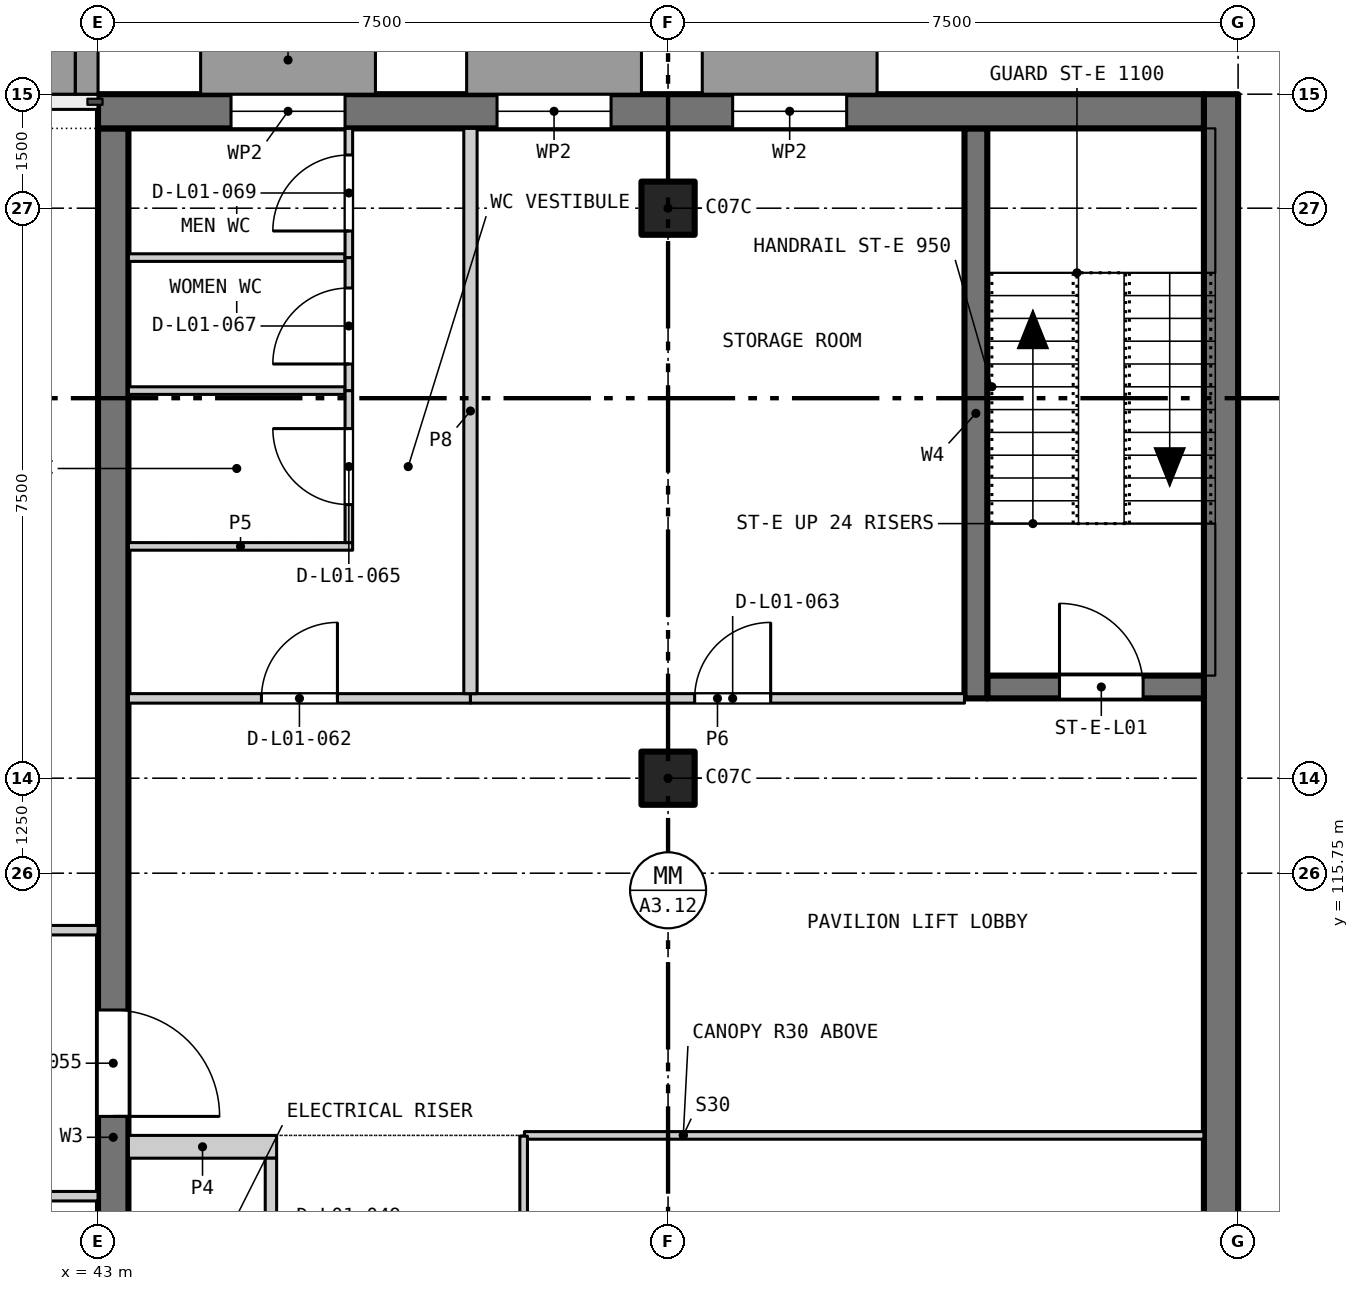
"""IFC4 building model, lengths in metres.
Left out: names, types, materials, properties, quantities, classifications, styles, units other than length and angle.
Written with IfcOpenShell. Run it as: python <this file> out.ifc"""

import sys

from ifc_helpers import new_model, si_unit, direction, frame, frame_2d, origin, origin_2d, place, context, subcontext, project, spatial, rectangle, extrude, element, fill, save


model = new_model("IFC4")
c1 = context("Model", 3, precision=1e-05, world=origin(), true_north=direction((0.0, 1.0)))
c2 = subcontext(c1, "Body", "Model", "MODEL_VIEW")
j1 = project(units=[si_unit("LENGTHUNIT", "METRE"), si_unit("PLANEANGLEUNIT", "RADIAN")], contexts=[c1])
p1 = place(None, origin())
s1 = spatial("IfcSite", under=j1, at=p1, CompositionType="ELEMENT")
p2 = place(p1, origin())
s2 = spatial("IfcBuilding", under=s1, at=p2, CompositionType="ELEMENT")
p3 = place(p2, frame((0.0, 0.0, 6.0)))
s3 = spatial("IfcBuildingStorey", under=s2, at=p3, CompositionType="ELEMENT", Elevation=6.0)
for number, where, z_axis, x_axis in (
    (1, (50.5, 117.0, 0.0), (0.0, 0.0, 1.0), (1.0, 0.0, 0.0)),
    (2, (50.5, 124.5, 0.0), (0.0, 0.0, 1.0), (1.0, 0.0, 0.0)),
):
    element("IfcColumn", number, at=place(p3, frame(where, z_axis=z_axis, x_axis=x_axis)), inside=s3, PredefinedType="COLUMN", context=c2, shape_type="SweptSolid", body=[
        extrude(rectangle(XDim=0.7, YDim=0.7, at=origin_2d()), origin(), (0.0, 0.0, 1.0), 3.9),
    ])
p4 = place(p3, frame((43.2, 99.0, 0.0), z_axis=(0.0, 0.0, 1.0), x_axis=(0.0, 1.0, 0.0)))
e3 = element("IfcWall", 3, at=p4, inside=s3, PredefinedType="SHEAR", context=c2, shape_type="SweptSolid", body=[
    extrude(rectangle(XDim=26.55, YDim=0.4, at=frame_2d((13.275, 0.0))), origin(), (0.0, 0.0, 1.0), 4.2),
])
p5 = place(p4, frame((13.55, 0.0, 0.0)))
e4 = element("IfcOpeningElement", 4, at=p5, cuts=e3, PredefinedType="OPENING", context=c2, shape_type="SweptSolid", body=[
    extrude(rectangle(XDim=1.4, YDim=2.4, at=frame_2d((0.7, 1.2))), frame((0.0, 0.21, 0.0), z_axis=(0.0, -1.0, 0.0), x_axis=(1.0, 0.0, 0.0)), (0.0, 0.0, 1.0), 0.42),
])
p6 = place(p3, frame((54.7, 118.2, 0.0), z_axis=(0.0, 0.0, 1.0), x_axis=(1.0, 0.0, 0.0)))
e5 = element("IfcWall", 5, at=p6, inside=s3, PredefinedType="SHEAR", context=c2, shape_type="SweptSolid", body=[
    extrude(rectangle(XDim=3.0, YDim=0.3, at=frame_2d((1.5, 0.0))), origin(), (0.0, 0.0, 1.0), 4.2),
])
p7 = place(p6, frame((0.95, 0.0, 0.0)))
e6 = element("IfcOpeningElement", 6, at=p7, cuts=e5, PredefinedType="OPENING", context=c2, shape_type="SweptSolid", body=[
    extrude(rectangle(XDim=1.1, YDim=2.1, at=frame_2d((0.55, 1.05))), frame((0.0, 0.16, 0.0), z_axis=(0.0, -1.0, 0.0), x_axis=(1.0, 0.0, 0.0)), (0.0, 0.0, 1.0), 0.32),
])
p8 = place(p3, frame((54.55, 118.05, 0.0), z_axis=(0.0, 0.0, 1.0), x_axis=(0.0, 1.0, 0.0)))
e7 = element("IfcWall", 7, at=p8, inside=s3, PredefinedType="SHEAR", context=c2, shape_type="SweptSolid", body=[
    extrude(rectangle(XDim=7.5, YDim=0.3, at=frame_2d((3.75, 0.0))), origin(), (0.0, 0.0, 1.0), 4.2),
])
p9 = place(p3, frame((57.775, 126.0, 0.0), z_axis=(0.0, 0.0, 1.0), x_axis=(0.0, -1.0, 0.0)))
e8 = element("IfcWall", 8, at=p9, inside=s3, PredefinedType="SOLIDWALL", context=c2, shape_type="SweptSolid", body=[
    extrude(rectangle(XDim=27.0, YDim=0.45, at=frame_2d((13.5, 0.0))), origin(), (0.0, 0.0, 1.0), 3.9),
])
p10 = place(p9, frame((20.75, 0.0, 0.8)))
e9 = element("IfcOpeningElement", 9, at=p10, cuts=e8, PredefinedType="OPENING", context=c2, shape_type="SweptSolid", body=[
    extrude(rectangle(XDim=1.5, YDim=2.2, at=frame_2d((0.75, 1.1))), frame((0.0, 0.235, 0.0), z_axis=(0.0, -1.0, 0.0), x_axis=(1.0, 0.0, 0.0)), (0.0, 0.0, 1.0), 0.47),
])
p11 = place(p9, frame((14.75, 0.0, 0.8)))
e10 = element("IfcOpeningElement", 10, at=p11, cuts=e8, PredefinedType="OPENING", context=c2, shape_type="SweptSolid", body=[
    extrude(rectangle(XDim=1.5, YDim=2.2, at=frame_2d((0.75, 1.1))), frame((0.0, 0.235, 0.0), z_axis=(0.0, -1.0, 0.0), x_axis=(1.0, 0.0, 0.0)), (0.0, 0.0, 1.0), 0.47),
])
p12 = place(p3, frame((43.0, 125.775, 0.0), z_axis=(0.0, 0.0, 1.0), x_axis=(1.0, 0.0, 0.0)))
e11 = element("IfcWall", 11, at=p12, inside=s3, PredefinedType="SOLIDWALL", context=c2, shape_type="SweptSolid", body=[
    extrude(rectangle(XDim=14.55, YDim=0.45, at=frame_2d((7.275, 0.0))), origin(), (0.0, 0.0, 1.0), 3.9),
])
p13 = place(p12, frame((8.35, 0.0, 0.8)))
e12 = element("IfcOpeningElement", 12, at=p13, cuts=e11, PredefinedType="OPENING", context=c2, shape_type="SweptSolid", body=[
    extrude(rectangle(XDim=1.5, YDim=2.2, at=frame_2d((0.75, 1.1))), frame((0.0, 0.235, 0.0), z_axis=(0.0, -1.0, 0.0), x_axis=(1.0, 0.0, 0.0)), (0.0, 0.0, 1.0), 0.47),
])
p14 = place(p12, frame((5.25, 0.0, 0.8)))
e13 = element("IfcOpeningElement", 13, at=p14, cuts=e11, PredefinedType="OPENING", context=c2, shape_type="SweptSolid", body=[
    extrude(rectangle(XDim=1.5, YDim=2.2, at=frame_2d((0.75, 1.1))), frame((0.0, 0.235, 0.0), z_axis=(0.0, -1.0, 0.0), x_axis=(1.0, 0.0, 0.0)), (0.0, 0.0, 1.0), 0.47),
])
p15 = place(p12, frame((1.75, 0.0, 0.8)))
e14 = element("IfcOpeningElement", 14, at=p15, cuts=e11, PredefinedType="OPENING", context=c2, shape_type="SweptSolid", body=[
    extrude(rectangle(XDim=1.5, YDim=2.2, at=frame_2d((0.75, 1.1))), frame((0.0, 0.235, 0.0), z_axis=(0.0, -1.0, 0.0), x_axis=(1.0, 0.0, 0.0)), (0.0, 0.0, 1.0), 0.47),
])
p16 = place(p3, frame((43.4, 112.15, 0.0), z_axis=(0.0, 0.0, 1.0), x_axis=(1.0, 0.0, 0.0)))
e15 = element("IfcWall", 15, at=p16, inside=s3, PredefinedType="PARTITIONING", context=c2, shape_type="SweptSolid", body=[
    extrude(rectangle(XDim=1.95, YDim=0.3, at=frame_2d((0.975, 0.0))), origin(), (0.0, 0.0, 1.0), 3.9),
])
p17 = place(p3, frame((45.275, 108.4, 0.0), z_axis=(0.0, 0.0, 1.0), x_axis=(0.0, 1.0, 0.0)))
e16 = element("IfcWall", 16, at=p17, inside=s3, PredefinedType="PARTITIONING", context=c2, shape_type="SweptSolid", body=[
    extrude(rectangle(XDim=3.6, YDim=0.15, at=frame_2d((1.8, 0.0))), origin(), (0.0, 0.0, 1.0), 3.9),
])
p18 = place(p17, frame((1.35, 0.0, 0.0)))
e17 = element("IfcOpeningElement", 17, at=p18, cuts=e16, PredefinedType="OPENING", context=c2, shape_type="SweptSolid", body=[
    extrude(rectangle(XDim=0.9, YDim=2.1, at=frame_2d((0.45, 1.05))), frame((0.0, 0.085, 0.0), z_axis=(0.0, -1.0, 0.0), x_axis=(1.0, 0.0, 0.0)), (0.0, 0.0, 1.0), 0.17),
])
p19 = place(p3, frame((29.0, 111.5, 0.0), z_axis=(0.0, 0.0, 1.0), x_axis=(1.0, 0.0, 0.0)))
e18 = element("IfcWall", 18, at=p19, inside=s3, PredefinedType="PARTITIONING", context=c2, shape_type="SweptSolid", body=[
    extrude(rectangle(XDim=14.0, YDim=0.125, at=frame_2d((7.0, 0.0))), origin(), (0.0, 0.0, 1.0), 3.9),
])
p20 = place(p19, frame((1.2, 0.0, 0.0)))
e19 = element("IfcOpeningElement", 19, at=p20, cuts=e18, PredefinedType="OPENING", context=c2, shape_type="SweptSolid", body=[
    extrude(rectangle(XDim=1.8, YDim=2.1, at=frame_2d((0.9, 1.05))), frame((0.0, 0.073, 0.0), z_axis=(0.0, -1.0, 0.0), x_axis=(1.0, 0.0, 0.0)), (0.0, 0.0, 1.0), 0.145),
])
p21 = place(p19, frame((11.0, 0.0, 0.0)))
e20 = element("IfcOpeningElement", 20, at=p21, cuts=e18, PredefinedType="OPENING", context=c2, shape_type="SweptSolid", body=[
    extrude(rectangle(XDim=1.8, YDim=2.1, at=frame_2d((0.9, 1.05))), frame((0.0, 0.073, 0.0), z_axis=(0.0, -1.0, 0.0), x_axis=(1.0, 0.0, 0.0)), (0.0, 0.0, 1.0), 0.145),
])
p22 = place(p3, frame((48.61, 112.3, 0.0), z_axis=(0.0, 0.0, 1.0), x_axis=(1.0, 0.0, 0.0)))
e21 = element("IfcWall", 21, at=p22, inside=s3, PredefinedType="PARTITIONING", context=c2, shape_type="SweptSolid", body=[
    extrude(rectangle(XDim=8.94, YDim=0.1, at=frame_2d((4.47, 0.0))), origin(), (0.0, 0.0, 1.0), 3.9),
])
p23 = place(p3, frame((29.0, 115.0, 0.0), z_axis=(0.0, 0.0, 1.0), x_axis=(1.0, 0.0, 0.0)))
e22 = element("IfcWall", 22, at=p23, inside=s3, PredefinedType="PARTITIONING", context=c2, shape_type="SweptSolid", body=[
    extrude(rectangle(XDim=14.0, YDim=0.125, at=frame_2d((7.0, 0.0))), origin(), (0.0, 0.0, 1.0), 3.9),
])
p24 = place(p23, frame((1.2, 0.0, 0.0)))
e23 = element("IfcOpeningElement", 23, at=p24, cuts=e22, PredefinedType="OPENING", context=c2, shape_type="SweptSolid", body=[
    extrude(rectangle(XDim=1.8, YDim=2.1, at=frame_2d((0.9, 1.05))), frame((0.0, 0.073, 0.0), z_axis=(0.0, -1.0, 0.0), x_axis=(1.0, 0.0, 0.0)), (0.0, 0.0, 1.0), 0.145),
])
p25 = place(p23, frame((11.0, 0.0, 0.0)))
e24 = element("IfcOpeningElement", 24, at=p25, cuts=e22, PredefinedType="OPENING", context=c2, shape_type="SweptSolid", body=[
    extrude(rectangle(XDim=1.8, YDim=2.1, at=frame_2d((0.9, 1.05))), frame((0.0, 0.073, 0.0), z_axis=(0.0, -1.0, 0.0), x_axis=(1.0, 0.0, 0.0)), (0.0, 0.0, 1.0), 0.145),
])
p26 = place(p3, frame((43.4, 118.05, 0.0), z_axis=(0.0, 0.0, 1.0), x_axis=(1.0, 0.0, 0.0)))
e25 = element("IfcWall", 25, at=p26, inside=s3, PredefinedType="PARTITIONING", context=c2, shape_type="SweptSolid", body=[
    extrude(rectangle(XDim=4.5, YDim=0.125, at=frame_2d((2.25, 0.0))), origin(), (0.0, 0.0, 1.0), 3.9),
])
p27 = place(p26, frame((1.75, 0.0, 0.0)))
e26 = element("IfcOpeningElement", 26, at=p27, cuts=e25, PredefinedType="OPENING", context=c2, shape_type="SweptSolid", body=[
    extrude(rectangle(XDim=1.0, YDim=2.1, at=frame_2d((0.5, 1.05))), frame((0.0, 0.073, 0.0), z_axis=(0.0, -1.0, 0.0), x_axis=(1.0, 0.0, 0.0)), (0.0, 0.0, 1.0), 0.145),
])
p28 = place(p3, frame((47.9, 118.05, 0.0), z_axis=(0.0, 0.0, 1.0), x_axis=(1.0, 0.0, 0.0)))
e27 = element("IfcWall", 27, at=p28, inside=s3, PredefinedType="PARTITIONING", context=c2, shape_type="SweptSolid", body=[
    extrude(rectangle(XDim=6.5, YDim=0.125, at=frame_2d((3.25, 0.0))), origin(), (0.0, 0.0, 1.0), 3.9),
])
p29 = place(p28, frame((2.95, 0.0, 0.0)))
e28 = element("IfcOpeningElement", 28, at=p29, cuts=e27, PredefinedType="OPENING", context=c2, shape_type="SweptSolid", body=[
    extrude(rectangle(XDim=1.0, YDim=2.1, at=frame_2d((0.5, 1.05))), frame((0.0, 0.073, 0.0), z_axis=(0.0, -1.0, 0.0), x_axis=(1.0, 0.0, 0.0)), (0.0, 0.0, 1.0), 0.145),
])
p30 = place(p3, frame((43.4, 120.05, 0.0), z_axis=(0.0, 0.0, 1.0), x_axis=(1.0, 0.0, 0.0)))
e29 = element("IfcWall", 29, at=p30, inside=s3, PredefinedType="PARTITIONING", context=c2, shape_type="SweptSolid", body=[
    extrude(rectangle(XDim=2.95, YDim=0.1, at=frame_2d((1.475, 0.0))), origin(), (0.0, 0.0, 1.0), 3.9),
])
for number, where, z_axis, x_axis in (
    (30, (43.4, 122.1, 0.0), (0.0, 0.0, 1.0), (1.0, 0.0, 0.0)),
    (31, (43.4, 123.85, 0.0), (0.0, 0.0, 1.0), (1.0, 0.0, 0.0)),
):
    element("IfcWall", number, at=place(p3, frame(where, z_axis=z_axis, x_axis=x_axis)), inside=s3, PredefinedType="PARTITIONING", context=c2, shape_type="SweptSolid", body=[
        extrude(rectangle(XDim=2.85, YDim=0.1, at=frame_2d((1.425, 0.0))), origin(), (0.0, 0.0, 1.0), 3.9),
    ])
p31 = place(p3, frame((46.3, 120.1, 0.0), z_axis=(0.0, 0.0, 1.0), x_axis=(0.0, 1.0, 0.0)))
e32 = element("IfcWall", 32, at=p31, inside=s3, PredefinedType="PARTITIONING", context=c2, shape_type="SweptSolid", body=[
    extrude(rectangle(XDim=2.0, YDim=0.1, at=frame_2d((1.0, 0.0))), origin(), (0.0, 0.0, 1.0), 3.9),
])
p32 = place(p31, frame((0.5, 0.0, 0.0)))
e33 = element("IfcOpeningElement", 33, at=p32, cuts=e32, PredefinedType="OPENING", context=c2, shape_type="SweptSolid", body=[
    extrude(rectangle(XDim=1.0, YDim=2.1, at=frame_2d((0.5, 1.05))), frame((0.0, 0.06, 0.0), z_axis=(0.0, -1.0, 0.0), x_axis=(1.0, 0.0, 0.0)), (0.0, 0.0, 1.0), 0.12),
])
p33 = place(p3, frame((46.3, 122.1, 0.0), z_axis=(0.0, 0.0, 1.0), x_axis=(0.0, 1.0, 0.0)))
e34 = element("IfcWall", 34, at=p33, inside=s3, PredefinedType="PARTITIONING", context=c2, shape_type="SweptSolid", body=[
    extrude(rectangle(XDim=1.75, YDim=0.1, at=frame_2d((0.875, 0.0))), origin(), (0.0, 0.0, 1.0), 3.9),
])
p34 = place(p33, frame((0.35, 0.0, 0.0)))
e35 = element("IfcOpeningElement", 35, at=p34, cuts=e34, PredefinedType="OPENING", context=c2, shape_type="SweptSolid", body=[
    extrude(rectangle(XDim=1.0, YDim=2.1, at=frame_2d((0.5, 1.05))), frame((0.0, 0.06, 0.0), z_axis=(0.0, -1.0, 0.0), x_axis=(1.0, 0.0, 0.0)), (0.0, 0.0, 1.0), 0.12),
])
p35 = place(p3, frame((46.3, 123.85, 0.0), z_axis=(0.0, 0.0, 1.0), x_axis=(0.0, 1.0, 0.0)))
e36 = element("IfcWall", 36, at=p35, inside=s3, PredefinedType="PARTITIONING", context=c2, shape_type="SweptSolid", body=[
    extrude(rectangle(XDim=1.7, YDim=0.1, at=frame_2d((0.85, 0.0))), origin(), (0.0, 0.0, 1.0), 3.9),
])
p36 = place(p35, frame((0.35, 0.0, 0.0)))
e37 = element("IfcOpeningElement", 37, at=p36, cuts=e36, PredefinedType="OPENING", context=c2, shape_type="SweptSolid", body=[
    extrude(rectangle(XDim=1.0, YDim=2.1, at=frame_2d((0.5, 1.05))), frame((0.0, 0.06, 0.0), z_axis=(0.0, -1.0, 0.0), x_axis=(1.0, 0.0, 0.0)), (0.0, 0.0, 1.0), 0.12),
])
p37 = place(p3, frame((47.9, 118.113, 0.0), z_axis=(0.0, 0.0, 1.0), x_axis=(0.0, 1.0, 0.0)))
e38 = element("IfcWall", 38, at=p37, inside=s3, PredefinedType="PARTITIONING", context=c2, shape_type="SweptSolid", body=[
    extrude(rectangle(XDim=7.438, YDim=0.175, at=frame_2d((3.719, 0.0))), origin(), (0.0, 0.0, 1.0), 3.9),
])
p38 = place(p3, frame((48.6, 108.962, 0.0), z_axis=(0.0, 0.0, 1.0), x_axis=(0.0, 1.0, 0.0)))
e39 = element("IfcWall", 39, at=p38, inside=s3, PredefinedType="PARTITIONING", context=c2, shape_type="SweptSolid", body=[
    extrude(rectangle(XDim=3.328, YDim=0.1, at=frame_2d((1.664, 0.0))), origin(), (0.0, 0.0, 1.0), 3.9),
])
p39 = place(p13, origin())
e40 = element("IfcWindow", 40, at=p39, inside=s3, PartitioningType="SINGLE_PANEL", PredefinedType="WINDOW", context=c2, shape_type="SweptSolid", body=[
    extrude(rectangle(XDim=1.5, YDim=2.2, at=frame_2d((0.75, 1.1))), frame((0.0, -0.075, 0.0), z_axis=(0.0, -1.0, 0.0), x_axis=(1.0, 0.0, 0.0)), (0.0, 0.0, 1.0), 0.06),
])
fill(e12, e40)
p40 = place(p14, origin())
e41 = element("IfcWindow", 41, at=p40, inside=s3, PartitioningType="SINGLE_PANEL", PredefinedType="WINDOW", context=c2, shape_type="SweptSolid", body=[
    extrude(rectangle(XDim=1.5, YDim=2.2, at=frame_2d((0.75, 1.1))), frame((0.0, -0.075, 0.0), z_axis=(0.0, -1.0, 0.0), x_axis=(1.0, 0.0, 0.0)), (0.0, 0.0, 1.0), 0.06),
])
fill(e13, e41)
p41 = place(p15, origin())
e42 = element("IfcWindow", 42, at=p41, inside=s3, PartitioningType="SINGLE_PANEL", PredefinedType="WINDOW", context=c2, shape_type="SweptSolid", body=[
    extrude(rectangle(XDim=1.5, YDim=2.2, at=frame_2d((0.75, 1.1))), frame((0.0, -0.075, 0.0), z_axis=(0.0, -1.0, 0.0), x_axis=(1.0, 0.0, 0.0)), (0.0, 0.0, 1.0), 0.06),
])
fill(e14, e42)
p42 = place(p5, frame((1.4, 0.0, 0.0), z_axis=(0.0, 0.0, 1.0), x_axis=(-1.0, 0.0, 0.0)))
e43 = element("IfcDoor", 43, at=p42, inside=s3, OperationType="SINGLE_SWING_RIGHT", PredefinedType="DOOR", context=c2, shape_type="SweptSolid", body=[
    extrude(rectangle(XDim=1.4, YDim=2.4, at=frame_2d((0.7, 1.2))), frame((0.0, 0.025, 0.0), z_axis=(0.0, -1.0, 0.0), x_axis=(1.0, 0.0, 0.0)), (0.0, 0.0, 1.0), 0.05),
])
fill(e4, e43)
p43 = place(p27, origin())
e44 = element("IfcDoor", 44, at=p43, inside=s3, OperationType="SINGLE_SWING_RIGHT", PredefinedType="DOOR", context=c2, shape_type="SweptSolid", body=[
    extrude(rectangle(XDim=1.0, YDim=2.1, at=frame_2d((0.5, 1.05))), frame((0.0, 0.025, 0.0), z_axis=(0.0, -1.0, 0.0), x_axis=(1.0, 0.0, 0.0)), (0.0, 0.0, 1.0), 0.05),
])
fill(e26, e44)
p44 = place(p29, origin())
e45 = element("IfcDoor", 45, at=p44, inside=s3, OperationType="SINGLE_SWING_RIGHT", PredefinedType="DOOR", context=c2, shape_type="SweptSolid", body=[
    extrude(rectangle(XDim=1.0, YDim=2.1, at=frame_2d((0.5, 1.05))), frame((0.0, 0.025, 0.0), z_axis=(0.0, -1.0, 0.0), x_axis=(1.0, 0.0, 0.0)), (0.0, 0.0, 1.0), 0.05),
])
fill(e28, e45)
p45 = place(p32, origin())
e46 = element("IfcDoor", 46, at=p45, inside=s3, OperationType="SINGLE_SWING_RIGHT", PredefinedType="DOOR", context=c2, shape_type="SweptSolid", body=[
    extrude(rectangle(XDim=1.0, YDim=2.1, at=frame_2d((0.5, 1.05))), frame((0.0, 0.025, 0.0), z_axis=(0.0, -1.0, 0.0), x_axis=(1.0, 0.0, 0.0)), (0.0, 0.0, 1.0), 0.05),
])
fill(e33, e46)
p46 = place(p34, origin())
e47 = element("IfcDoor", 47, at=p46, inside=s3, OperationType="SINGLE_SWING_LEFT", PredefinedType="DOOR", context=c2, shape_type="SweptSolid", body=[
    extrude(rectangle(XDim=1.0, YDim=2.1, at=frame_2d((0.5, 1.05))), frame((0.0, 0.025, 0.0), z_axis=(0.0, -1.0, 0.0), x_axis=(1.0, 0.0, 0.0)), (0.0, 0.0, 1.0), 0.05),
])
fill(e35, e47)
p47 = place(p36, origin())
e48 = element("IfcDoor", 48, at=p47, inside=s3, OperationType="SINGLE_SWING_LEFT", PredefinedType="DOOR", context=c2, shape_type="SweptSolid", body=[
    extrude(rectangle(XDim=1.0, YDim=2.1, at=frame_2d((0.5, 1.05))), frame((0.0, 0.025, 0.0), z_axis=(0.0, -1.0, 0.0), x_axis=(1.0, 0.0, 0.0)), (0.0, 0.0, 1.0), 0.05),
])
fill(e37, e48)
p48 = place(p7, origin())
e49 = element("IfcDoor", 49, at=p48, inside=s3, OperationType="SINGLE_SWING_LEFT", PredefinedType="DOOR", context=c2, shape_type="SweptSolid", body=[
    extrude(rectangle(XDim=1.1, YDim=2.1, at=frame_2d((0.55, 1.05))), frame((0.0, 0.025, 0.0), z_axis=(0.0, -1.0, 0.0), x_axis=(1.0, 0.0, 0.0)), (0.0, 0.0, 1.0), 0.05),
])
fill(e6, e49)
save(model, sys.argv[1])
